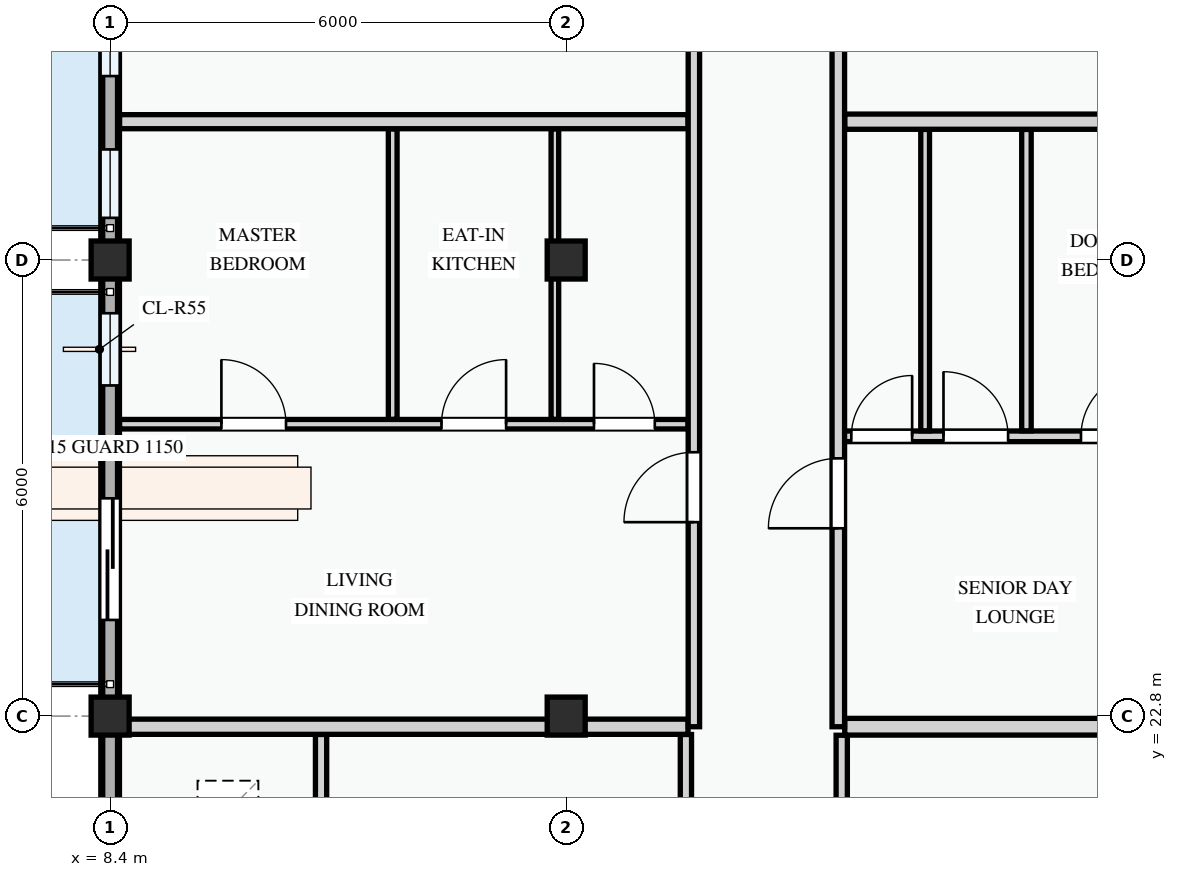
"""IFC4 building model, lengths in metres.
Left out: names, types, materials, properties, quantities, classifications, styles, units other than length and angle.
Written with IfcOpenShell. Run it as: python <this file> out.ifc"""

import sys

from ifc_helpers import new_model, si_unit, direction, frame, frame_2d, origin, origin_2d, place, context, subcontext, project, spatial, polyline, rectangle, outline, extrude, element, fill, save


model = new_model("IFC4")
c1 = context("Model", 3, precision=1e-05, world=origin(), true_north=direction((0.0, 1.0)))
c2 = subcontext(c1, "Body", "Model", "MODEL_VIEW")
j1 = project(units=[si_unit("LENGTHUNIT", "METRE"), si_unit("PLANEANGLEUNIT", "RADIAN")], contexts=[c1])
p1 = place(None, origin())
s1 = spatial("IfcSite", under=j1, at=p1, CompositionType="ELEMENT")
p2 = place(p1, origin())
s2 = spatial("IfcBuilding", under=s1, at=p2, CompositionType="ELEMENT")
p3 = place(p2, frame((0.0, 0.0, 34.5)))
s3 = spatial("IfcBuildingStorey", under=s2, at=p3, CompositionType="ELEMENT", Elevation=34.5)
for number, where, z_axis, x_axis in (
    (1, (8.4, 22.8, 0.0), (0.0, 0.0, 1.0), (1.0, 0.0, 0.0)),
    (2, (8.4, 28.8, 0.0), (0.0, 0.0, 1.0), (1.0, 0.0, 0.0)),
    (3, (14.4, 22.8, 0.0), (0.0, 0.0, 1.0), (1.0, 0.0, 0.0)),
    (4, (14.4, 28.8, 0.0), (0.0, 0.0, 1.0), (1.0, 0.0, 0.0)),
):
    element("IfcColumn", number, at=place(p3, frame(where, z_axis=z_axis, x_axis=x_axis)), inside=s3, PredefinedType="COLUMN", context=c2, shape_type="SweptSolid", body=[
        extrude(rectangle(XDim=0.5, YDim=0.5, at=origin_2d()), origin(), (0.0, 0.0, 1.0), 3.3),
    ])
p4 = place(p3, frame((8.4, 37.2, 0.0), z_axis=(0.0, 0.0, 1.0), x_axis=(0.0, -1.0, 0.0)))
e5 = element("IfcWall", 5, at=p4, inside=s3, PredefinedType="STANDARD", context=c2, shape_type="SweptSolid", body=[
    extrude(rectangle(XDim=8.4, YDim=0.245, at=frame_2d((4.2, 0.0))), origin(), (0.0, 0.0, 1.0), 2.345),
])
p5 = place(p4, frame((2.05, 0.0, 0.0)))
e6 = element("IfcOpeningElement", 6, at=p5, cuts=e5, PredefinedType="OPENING", context=c2, shape_type="SweptSolid", body=[
    extrude(rectangle(XDim=1.5, YDim=2.2, at=frame_2d((0.75, 1.1))), frame((0.0, 0.133, 0.0), z_axis=(0.0, -1.0, 0.0), x_axis=(1.0, 0.0, 0.0)), (0.0, 0.0, 1.0), 0.265),
])
p6 = place(p4, frame((0.505, 0.0, 0.78)))
e7 = element("IfcOpeningElement", 7, at=p6, cuts=e5, PredefinedType="OPENING", context=c2, shape_type="SweptSolid", body=[
    extrude(rectangle(XDim=0.9, YDim=1.2, at=frame_2d((0.45, 0.6))), frame((0.0, 0.133, 0.0), z_axis=(0.0, -1.0, 0.0), x_axis=(1.0, 0.0, 0.0)), (0.0, 0.0, 1.0), 0.265),
])
p7 = place(p4, frame((4.2, 0.0, 0.78)))
e8 = element("IfcOpeningElement", 8, at=p7, cuts=e5, PredefinedType="OPENING", context=c2, shape_type="SweptSolid", body=[
    extrude(rectangle(XDim=1.78, YDim=1.42, at=frame_2d((0.89, 0.71))), frame((0.0, 0.133, 0.0), z_axis=(0.0, -1.0, 0.0), x_axis=(1.0, 0.0, 0.0)), (0.0, 0.0, 1.0), 0.265),
])
p8 = place(p4, frame((6.945, 0.0, 0.78)))
e9 = element("IfcOpeningElement", 9, at=p8, cuts=e5, PredefinedType="OPENING", context=c2, shape_type="SweptSolid", body=[
    extrude(rectangle(XDim=0.9, YDim=1.2, at=frame_2d((0.45, 0.6))), frame((0.0, 0.133, 0.0), z_axis=(0.0, -1.0, 0.0), x_axis=(1.0, 0.0, 0.0)), (0.0, 0.0, 1.0), 0.265),
])
p9 = place(p3, frame((8.4, 28.8, 0.0), z_axis=(0.0, 0.0, 1.0), x_axis=(0.0, -1.0, 0.0)))
e10 = element("IfcWall", 10, at=p9, inside=s3, PredefinedType="STANDARD", context=c2, shape_type="SweptSolid", body=[
    extrude(rectangle(XDim=6.0, YDim=0.245, at=frame_2d((3.0, 0.0))), origin(), (0.0, 0.0, 1.0), 2.445),
])
p10 = place(p9, frame((3.135, 0.0, 0.0)))
e11 = element("IfcOpeningElement", 11, at=p10, cuts=e10, PredefinedType="OPENING", context=c2, shape_type="SweptSolid", body=[
    extrude(rectangle(XDim=1.6, YDim=2.2, at=frame_2d((0.8, 1.1))), frame((0.0, 0.133, 0.0), z_axis=(0.0, -1.0, 0.0), x_axis=(1.0, 0.0, 0.0)), (0.0, 0.0, 1.0), 0.265),
])
p11 = place(p9, frame((0.7, 0.0, 0.78)))
e12 = element("IfcOpeningElement", 12, at=p11, cuts=e10, PredefinedType="OPENING", context=c2, shape_type="SweptSolid", body=[
    extrude(rectangle(XDim=0.95, YDim=1.15, at=frame_2d((0.475, 0.575))), frame((0.0, 0.133, 0.0), z_axis=(0.0, -1.0, 0.0), x_axis=(1.0, 0.0, 0.0)), (0.0, 0.0, 1.0), 0.265),
])
p12 = place(p3, frame((8.4, 22.8, 0.0), z_axis=(0.0, 0.0, 1.0), x_axis=(0.0, -1.0, 0.0)))
e13 = element("IfcWall", 13, at=p12, inside=s3, PredefinedType="STANDARD", context=c2, shape_type="SweptSolid", body=[
    extrude(rectangle(XDim=8.4, YDim=0.245, at=frame_2d((4.2, 0.0))), origin(), (0.0, 0.0, 1.0), 2.345),
])
p13 = place(p12, frame((1.305, 0.0, 0.78)))
e14 = element("IfcOpeningElement", 14, at=p13, cuts=e13, PredefinedType="OPENING", context=c2, shape_type="SweptSolid", body=[
    extrude(rectangle(XDim=1.78, YDim=1.42, at=frame_2d((0.89, 0.71))), frame((0.0, 0.133, 0.0), z_axis=(0.0, -1.0, 0.0), x_axis=(1.0, 0.0, 0.0)), (0.0, 0.0, 1.0), 0.265),
])
p14 = place(p12, frame((4.772, 0.0, 0.78)))
e15 = element("IfcOpeningElement", 15, at=p14, cuts=e13, PredefinedType="OPENING", context=c2, shape_type="SweptSolid", body=[
    extrude(rectangle(XDim=1.78, YDim=1.42, at=frame_2d((0.89, 0.71))), frame((0.0, 0.133, 0.0), z_axis=(0.0, -1.0, 0.0), x_axis=(1.0, 0.0, 0.0)), (0.0, 0.0, 1.0), 0.265),
])
p15 = place(p3, frame((8.4, 37.2, 3.3), z_axis=(0.0, 0.0, 1.0), x_axis=(0.0, -1.0, 0.0)))
e16 = element("IfcWall", 16, at=p15, inside=s3, PredefinedType="PARAPET", context=c2, shape_type="SweptSolid", body=[
    extrude(outline(polyline([(0.0, 0.0), (8.4, 0.0), (8.4, 1.12), (7.7, 1.322), (7.0, 1.484), (6.3, 1.618), (5.6, 1.717), (4.9, 1.779), (4.2, 1.8), (3.5, 1.779), (2.8, 1.717), (2.1, 1.618), (1.4, 1.484), (0.7, 1.322), (0.0, 1.12), (0.0, 0.0)])), frame((0.0, 0.098, 0.0), z_axis=(0.0, -1.0, 0.0), x_axis=(1.0, 0.0, 0.0)), (0.0, 0.0, 1.0), 0.195),
])
p16 = place(p3, frame((8.4, 28.8, 3.3), z_axis=(0.0, 0.0, 1.0), x_axis=(0.0, -1.0, 0.0)))
e17 = element("IfcWall", 17, at=p16, inside=s3, PredefinedType="PARAPET", context=c2, shape_type="SweptSolid", body=[
    extrude(outline(polyline([(0.0, 0.0), (6.0, 0.0), (6.0, 1.12), (5.5, 1.322), (5.0, 1.484), (4.5, 1.618), (4.0, 1.717), (3.5, 1.779), (3.0, 1.8), (2.5, 1.779), (2.0, 1.717), (1.5, 1.618), (1.0, 1.484), (0.5, 1.322), (0.0, 1.12), (0.0, 0.0)])), frame((0.0, 0.098, 0.0), z_axis=(0.0, -1.0, 0.0), x_axis=(1.0, 0.0, 0.0)), (0.0, 0.0, 1.0), 0.195),
])
p17 = place(p3, frame((8.4, 22.8, 3.3), z_axis=(0.0, 0.0, 1.0), x_axis=(0.0, -1.0, 0.0)))
e18 = element("IfcWall", 18, at=p17, inside=s3, PredefinedType="PARAPET", context=c2, shape_type="SweptSolid", body=[
    extrude(outline(polyline([(0.0, 0.0), (8.4, 0.0), (8.4, 1.12), (7.7, 1.322), (7.0, 1.484), (6.3, 1.618), (5.6, 1.717), (4.9, 1.779), (4.2, 1.8), (3.5, 1.779), (2.8, 1.717), (2.1, 1.618), (1.4, 1.484), (0.7, 1.322), (0.0, 1.12), (0.0, 0.0)])), frame((0.0, 0.098, 0.0), z_axis=(0.0, -1.0, 0.0), x_axis=(1.0, 0.0, 0.0)), (0.0, 0.0, 1.0), 0.195),
])
for number, where, z_axis, x_axis in (
    (19, (11.175, 18.676, 0.0), (0.0, 0.0, 1.0), (0.0, 1.0, 0.0)),
    (20, (15.975, 18.676, 0.0), (0.0, 0.0, 1.0), (0.0, 1.0, 0.0)),
):
    element("IfcWall", number, at=place(p3, frame(where, z_axis=z_axis, x_axis=x_axis)), inside=s3, PredefinedType="PARTITIONING", context=c2, shape_type="SweptSolid", body=[
        extrude(rectangle(XDim=3.882, YDim=0.148, at=frame_2d((1.941, 0.0))), origin(), (0.0, 0.0, 1.0), 3.0),
    ])
p18 = place(p3, frame((18.025, 18.676, 0.0), z_axis=(0.0, 0.0, 1.0), x_axis=(0.0, 1.0, 0.0)))
e21 = element("IfcWall", 21, at=p18, inside=s3, PredefinedType="PARTITIONING", context=c2, shape_type="SweptSolid", body=[
    extrude(rectangle(XDim=3.872, YDim=0.148, at=frame_2d((1.936, 0.0))), origin(), (0.0, 0.0, 1.0), 3.0),
])
p19 = place(p3, frame((8.524, 26.64, 0.0), z_axis=(0.0, 0.0, 1.0), x_axis=(1.0, 0.0, 0.0)))
e22 = element("IfcWall", 22, at=p19, inside=s3, PredefinedType="PARTITIONING", context=c2, shape_type="SweptSolid", body=[
    extrude(rectangle(XDim=7.479, YDim=0.125, at=frame_2d((3.739, 0.0))), origin(), (0.0, 0.0, 1.0), 3.0),
])
p20 = place(p19, frame((1.339, 0.0, 0.0)))
e23 = element("IfcOpeningElement", 23, at=p20, cuts=e22, PredefinedType="OPENING", context=c2, shape_type="SweptSolid", body=[
    extrude(rectangle(XDim=0.85, YDim=2.1, at=frame_2d((0.425, 1.05))), frame((0.0, 0.073, 0.0), z_axis=(0.0, -1.0, 0.0), x_axis=(1.0, 0.0, 0.0)), (0.0, 0.0, 1.0), 0.145),
])
p21 = place(p19, frame((4.235, 0.0, 0.0)))
e24 = element("IfcOpeningElement", 24, at=p21, cuts=e22, PredefinedType="OPENING", context=c2, shape_type="SweptSolid", body=[
    extrude(rectangle(XDim=0.85, YDim=2.1, at=frame_2d((0.425, 1.05))), frame((0.0, 0.073, 0.0), z_axis=(0.0, -1.0, 0.0), x_axis=(1.0, 0.0, 0.0)), (0.0, 0.0, 1.0), 0.145),
])
p22 = place(p19, frame((6.241, 0.0, 0.0)))
e25 = element("IfcOpeningElement", 25, at=p22, cuts=e22, PredefinedType="OPENING", context=c2, shape_type="SweptSolid", body=[
    extrude(rectangle(XDim=0.8, YDim=2.1, at=frame_2d((0.4, 1.05))), frame((0.0, 0.073, 0.0), z_axis=(0.0, -1.0, 0.0), x_axis=(1.0, 0.0, 0.0)), (0.0, 0.0, 1.0), 0.145),
])
p23 = place(p3, frame((12.118, 26.705, 0.0), z_axis=(0.0, 0.0, 1.0), x_axis=(0.0, 1.0, 0.0)))
e26 = element("IfcWall", 26, at=p23, inside=s3, PredefinedType="PARTITIONING", context=c2, shape_type="SweptSolid", body=[
    extrude(rectangle(XDim=3.821, YDim=0.115, at=frame_2d((1.91, 0.0))), origin(), (0.0, 0.0, 1.0), 3.0),
])
p24 = place(p3, frame((14.251, 26.705, 0.0), z_axis=(0.0, 0.0, 1.0), x_axis=(0.0, 1.0, 0.0)))
e27 = element("IfcWall", 27, at=p24, inside=s3, PredefinedType="PARTITIONING", context=c2, shape_type="SweptSolid", body=[
    extrude(rectangle(XDim=3.821, YDim=0.1, at=frame_2d((1.91, 0.0))), origin(), (0.0, 0.0, 1.0), 2.425),
])
p25 = place(p3, frame((17.98, 26.481, 0.0), z_axis=(0.0, 0.0, 1.0), x_axis=(1.0, 0.0, 0.0)))
e28 = element("IfcWall", 28, at=p25, inside=s3, PredefinedType="PARTITIONING", context=c2, shape_type="SweptSolid", body=[
    extrude(rectangle(XDim=4.696, YDim=0.14, at=frame_2d((2.348, 0.0))), origin(), (0.0, 0.0, 1.0), 3.0),
])
p26 = place(p25, frame((0.171, 0.0, 0.0)))
e29 = element("IfcOpeningElement", 29, at=p26, cuts=e28, PredefinedType="OPENING", context=c2, shape_type="SweptSolid", body=[
    extrude(rectangle(XDim=0.8, YDim=2.1, at=frame_2d((0.4, 1.05))), frame((0.0, 0.08, 0.0), z_axis=(0.0, -1.0, 0.0), x_axis=(1.0, 0.0, 0.0)), (0.0, 0.0, 1.0), 0.16),
])
p27 = place(p25, frame((1.384, 0.0, 0.0)))
e30 = element("IfcOpeningElement", 30, at=p27, cuts=e28, PredefinedType="OPENING", context=c2, shape_type="SweptSolid", body=[
    extrude(rectangle(XDim=0.85, YDim=2.1, at=frame_2d((0.425, 1.05))), frame((0.0, 0.08, 0.0), z_axis=(0.0, -1.0, 0.0), x_axis=(1.0, 0.0, 0.0)), (0.0, 0.0, 1.0), 0.16),
])
p28 = place(p25, frame((3.193, 0.0, 0.0)))
e31 = element("IfcOpeningElement", 31, at=p28, cuts=e28, PredefinedType="OPENING", context=c2, shape_type="SweptSolid", body=[
    extrude(rectangle(XDim=0.85, YDim=2.1, at=frame_2d((0.425, 1.05))), frame((0.0, 0.08, 0.0), z_axis=(0.0, -1.0, 0.0), x_axis=(1.0, 0.0, 0.0)), (0.0, 0.0, 1.0), 0.16),
])
p29 = place(p3, frame((20.455, 26.553, 0.0), z_axis=(0.0, 0.0, 1.0), x_axis=(0.0, 1.0, 0.0)))
e32 = element("IfcWall", 32, at=p29, inside=s3, PredefinedType="PARTITIONING", context=c2, shape_type="SweptSolid", body=[
    extrude(rectangle(XDim=3.965, YDim=0.125, at=frame_2d((1.983, 0.0))), origin(), (0.0, 0.0, 1.0), 3.0),
])
p30 = place(p3, frame((19.122, 26.553, 0.0), z_axis=(0.0, 0.0, 1.0), x_axis=(0.0, 1.0, 0.0)))
e33 = element("IfcWall", 33, at=p30, inside=s3, PredefinedType="PARTITIONING", context=c2, shape_type="SweptSolid", body=[
    extrude(rectangle(XDim=3.965, YDim=0.115, at=frame_2d((1.983, 0.0))), origin(), (0.0, 0.0, 1.0), 3.0),
])
p31 = place(p3, frame((8.524, 22.66, 0.0), z_axis=(0.0, 0.0, 1.0), x_axis=(1.0, 0.0, 0.0)))
e34 = element("IfcWall", 34, at=p31, inside=s3, PredefinedType="PARTITIONING", context=c2, shape_type="SweptSolid", body=[
    extrude(rectangle(XDim=7.479, YDim=0.2, at=frame_2d((3.739, 0.0))), origin(), (0.0, 0.0, 1.0), 2.375),
])
p32 = place(p3, frame((18.064, 22.66, 0.0), z_axis=(0.0, 0.0, 1.0), x_axis=(1.0, 0.0, 0.0)))
e35 = element("IfcWall", 35, at=p32, inside=s3, PredefinedType="PARTITIONING", context=c2, shape_type="SweptSolid", body=[
    extrude(rectangle(XDim=4.484, YDim=0.22, at=frame_2d((2.242, 0.0))), origin(), (0.0, 0.0, 1.0), 2.375),
])
p33 = place(p3, frame((8.524, 30.62, 0.0), z_axis=(0.0, 0.0, 1.0), x_axis=(1.0, 0.0, 0.0)))
e36 = element("IfcWall", 36, at=p33, inside=s3, PredefinedType="PARTITIONING", context=c2, shape_type="SweptSolid", body=[
    extrude(rectangle(XDim=7.479, YDim=0.185, at=frame_2d((3.739, 0.0))), origin(), (0.0, 0.0, 1.0), 3.0),
])
p34 = place(p3, frame((18.064, 30.62, 0.0), z_axis=(0.0, 0.0, 1.0), x_axis=(1.0, 0.0, 0.0)))
e37 = element("IfcWall", 37, at=p34, inside=s3, PredefinedType="PARTITIONING", context=c2, shape_type="SweptSolid", body=[
    extrude(rectangle(XDim=4.611, YDim=0.2, at=frame_2d((2.306, 0.0))), origin(), (0.0, 0.0, 1.0), 3.0),
])
p35 = place(p3, frame((16.08, 22.66, 0.0), z_axis=(0.0, 0.0, 1.0), x_axis=(0.0, 1.0, 0.0)))
e38 = element("IfcWall", 38, at=p35, inside=s3, PredefinedType="PARTITIONING", context=c2, shape_type="SweptSolid", body=[
    extrude(rectangle(XDim=20.416, YDim=0.15, at=frame_2d((10.208, 0.0))), origin(), (0.0, 0.0, 1.0), 3.0),
])
p36 = place(p35, frame((2.691, 0.0, 0.0)))
e39 = element("IfcOpeningElement", 39, at=p36, cuts=e38, PredefinedType="OPENING", context=c2, shape_type="SweptSolid", body=[
    extrude(rectangle(XDim=0.92, YDim=2.1, at=frame_2d((0.46, 1.05))), frame((0.0, 0.085, 0.0), z_axis=(0.0, -1.0, 0.0), x_axis=(1.0, 0.0, 0.0)), (0.0, 0.0, 1.0), 0.17),
])
p37 = place(p35, frame((9.91, 0.0, 0.0)))
e40 = element("IfcOpeningElement", 40, at=p37, cuts=e38, PredefinedType="OPENING", context=c2, shape_type="SweptSolid", body=[
    extrude(rectangle(XDim=0.92, YDim=2.1, at=frame_2d((0.46, 1.05))), frame((0.0, 0.085, 0.0), z_axis=(0.0, -1.0, 0.0), x_axis=(1.0, 0.0, 0.0)), (0.0, 0.0, 1.0), 0.17),
])
p38 = place(p3, frame((17.98, 22.66, 0.0), z_axis=(0.0, 0.0, 1.0), x_axis=(0.0, 1.0, 0.0)))
e41 = element("IfcWall", 41, at=p38, inside=s3, PredefinedType="PARTITIONING", context=c2, shape_type="SweptSolid", body=[
    extrude(rectangle(XDim=20.416, YDim=0.165, at=frame_2d((10.208, 0.0))), origin(), (0.0, 0.0, 1.0), 3.0),
])
p39 = place(p38, frame((2.611, 0.0, 0.0)))
e42 = element("IfcOpeningElement", 42, at=p39, cuts=e41, PredefinedType="OPENING", context=c2, shape_type="SweptSolid", body=[
    extrude(rectangle(XDim=0.92, YDim=2.1, at=frame_2d((0.46, 1.05))), frame((0.0, 0.093, 0.0), z_axis=(0.0, -1.0, 0.0), x_axis=(1.0, 0.0, 0.0)), (0.0, 0.0, 1.0), 0.185),
])
p40 = place(p38, frame((9.885, 0.0, 0.0)))
e43 = element("IfcOpeningElement", 43, at=p40, cuts=e41, PredefinedType="OPENING", context=c2, shape_type="SweptSolid", body=[
    extrude(rectangle(XDim=0.92, YDim=2.1, at=frame_2d((0.46, 1.05))), frame((0.0, 0.093, 0.0), z_axis=(0.0, -1.0, 0.0), x_axis=(1.0, 0.0, 0.0)), (0.0, 0.0, 1.0), 0.185),
])
p41 = place(p7, origin())
e44 = element("IfcWindow", 44, at=p41, inside=s3, PartitioningType="DOUBLE_PANEL_VERTICAL", PredefinedType="WINDOW", context=c2, shape_type="SweptSolid", body=[
    extrude(rectangle(XDim=1.78, YDim=1.42, at=frame_2d((0.89, 0.71))), frame((0.0, 0.03, 0.0), z_axis=(0.0, -1.0, 0.0), x_axis=(1.0, 0.0, 0.0)), (0.0, 0.0, 1.0), 0.06),
])
fill(e8, e44)
p42 = place(p8, origin())
e45 = element("IfcWindow", 45, at=p42, inside=s3, PartitioningType="SINGLE_PANEL", PredefinedType="WINDOW", context=c2, shape_type="SweptSolid", body=[
    extrude(rectangle(XDim=0.9, YDim=1.2, at=frame_2d((0.45, 0.6))), frame((0.0, 0.03, 0.0), z_axis=(0.0, -1.0, 0.0), x_axis=(1.0, 0.0, 0.0)), (0.0, 0.0, 1.0), 0.06),
])
fill(e9, e45)
p43 = place(p10, frame((1.6, 0.0, 0.0), z_axis=(0.0, 0.0, 1.0), x_axis=(-1.0, 0.0, 0.0)))
e46 = element("IfcDoor", 46, at=p43, inside=s3, OperationType="SLIDING_TO_LEFT", PredefinedType="DOOR", context=c2, shape_type="SweptSolid", body=[
    extrude(rectangle(XDim=1.6, YDim=2.2, at=frame_2d((0.8, 1.1))), frame((0.0, 0.025, 0.0), z_axis=(0.0, -1.0, 0.0), x_axis=(1.0, 0.0, 0.0)), (0.0, 0.0, 1.0), 0.05),
])
fill(e11, e46)
p44 = place(p11, origin())
e47 = element("IfcWindow", 47, at=p44, inside=s3, PartitioningType="SINGLE_PANEL", PredefinedType="WINDOW", context=c2, shape_type="SweptSolid", body=[
    extrude(rectangle(XDim=0.95, YDim=1.15, at=frame_2d((0.475, 0.575))), frame((0.0, 0.03, 0.0), z_axis=(0.0, -1.0, 0.0), x_axis=(1.0, 0.0, 0.0)), (0.0, 0.0, 1.0), 0.06),
])
fill(e12, e47)
p45 = place(p20, origin())
e48 = element("IfcDoor", 48, at=p45, inside=s3, OperationType="SINGLE_SWING_LEFT", PredefinedType="DOOR", context=c2, shape_type="SweptSolid", body=[
    extrude(rectangle(XDim=0.85, YDim=2.1, at=frame_2d((0.425, 1.05))), frame((0.0, 0.025, 0.0), z_axis=(0.0, -1.0, 0.0), x_axis=(1.0, 0.0, 0.0)), (0.0, 0.0, 1.0), 0.05),
])
fill(e23, e48)
p46 = place(p21, origin())
e49 = element("IfcDoor", 49, at=p46, inside=s3, OperationType="SINGLE_SWING_RIGHT", PredefinedType="DOOR", context=c2, shape_type="SweptSolid", body=[
    extrude(rectangle(XDim=0.85, YDim=2.1, at=frame_2d((0.425, 1.05))), frame((0.0, 0.025, 0.0), z_axis=(0.0, -1.0, 0.0), x_axis=(1.0, 0.0, 0.0)), (0.0, 0.0, 1.0), 0.05),
])
fill(e24, e49)
p47 = place(p22, origin())
e50 = element("IfcDoor", 50, at=p47, inside=s3, OperationType="SINGLE_SWING_LEFT", PredefinedType="DOOR", context=c2, shape_type="SweptSolid", body=[
    extrude(rectangle(XDim=0.8, YDim=2.1, at=frame_2d((0.4, 1.05))), frame((0.0, 0.025, 0.0), z_axis=(0.0, -1.0, 0.0), x_axis=(1.0, 0.0, 0.0)), (0.0, 0.0, 1.0), 0.05),
])
fill(e25, e50)
p48 = place(p26, origin())
e51 = element("IfcDoor", 51, at=p48, inside=s3, OperationType="SINGLE_SWING_RIGHT", PredefinedType="DOOR", context=c2, shape_type="SweptSolid", body=[
    extrude(rectangle(XDim=0.8, YDim=2.1, at=frame_2d((0.4, 1.05))), frame((0.0, 0.025, 0.0), z_axis=(0.0, -1.0, 0.0), x_axis=(1.0, 0.0, 0.0)), (0.0, 0.0, 1.0), 0.05),
])
fill(e29, e51)
p49 = place(p27, origin())
e52 = element("IfcDoor", 52, at=p49, inside=s3, OperationType="SINGLE_SWING_LEFT", PredefinedType="DOOR", context=c2, shape_type="SweptSolid", body=[
    extrude(rectangle(XDim=0.85, YDim=2.1, at=frame_2d((0.425, 1.05))), frame((0.0, 0.025, 0.0), z_axis=(0.0, -1.0, 0.0), x_axis=(1.0, 0.0, 0.0)), (0.0, 0.0, 1.0), 0.05),
])
fill(e30, e52)
p50 = place(p28, origin())
e53 = element("IfcDoor", 53, at=p50, inside=s3, OperationType="SINGLE_SWING_RIGHT", PredefinedType="DOOR", context=c2, shape_type="SweptSolid", body=[
    extrude(rectangle(XDim=0.85, YDim=2.1, at=frame_2d((0.425, 1.05))), frame((0.0, 0.025, 0.0), z_axis=(0.0, -1.0, 0.0), x_axis=(1.0, 0.0, 0.0)), (0.0, 0.0, 1.0), 0.05),
])
fill(e31, e53)
p51 = place(p36, origin())
e54 = element("IfcDoor", 54, at=p51, inside=s3, OperationType="SINGLE_SWING_LEFT", PredefinedType="DOOR", context=c2, shape_type="SweptSolid", body=[
    extrude(rectangle(XDim=0.92, YDim=2.1, at=frame_2d((0.46, 1.05))), frame((0.0, 0.025, 0.0), z_axis=(0.0, -1.0, 0.0), x_axis=(1.0, 0.0, 0.0)), (0.0, 0.0, 1.0), 0.05),
])
fill(e39, e54)
p52 = place(p39, origin())
e55 = element("IfcDoor", 55, at=p52, inside=s3, OperationType="SINGLE_SWING_LEFT", PredefinedType="DOOR", context=c2, shape_type="SweptSolid", body=[
    extrude(rectangle(XDim=0.92, YDim=2.1, at=frame_2d((0.46, 1.05))), frame((0.0, 0.025, 0.0), z_axis=(0.0, -1.0, 0.0), x_axis=(1.0, 0.0, 0.0)), (0.0, 0.0, 1.0), 0.05),
])
fill(e42, e55)
save(model, sys.argv[1])
